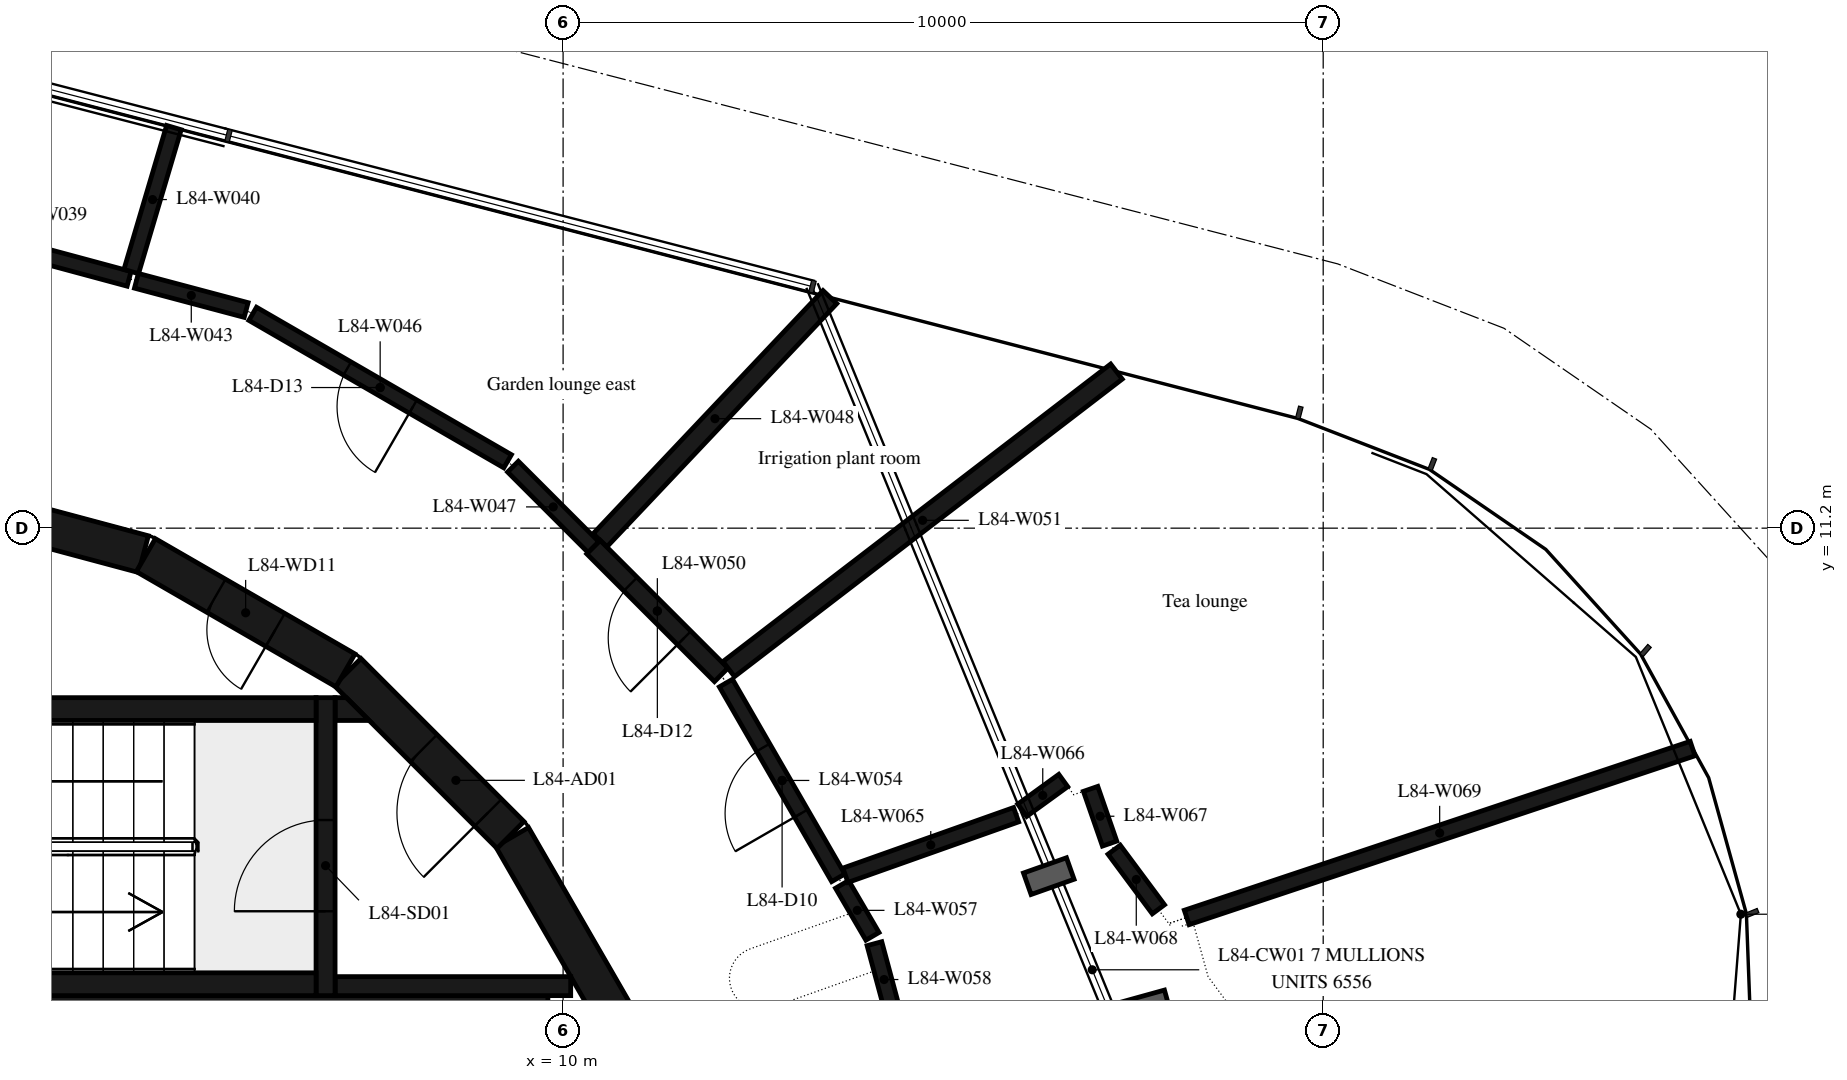
"""IFC4 building model, lengths in metres.
Left out: names, types, materials, properties, quantities, classifications, styles, units other than length and angle.
Written with IfcOpenShell. Run it as: python <this file> out.ifc"""

import sys

from ifc_helpers import new_model, si_unit, direction, frame, frame_2d, origin, place, context, subcontext, project, spatial, polyline, rectangle, outline, extrude, element, fill, save


model = new_model("IFC4")
c1 = context("Model", 3, precision=1e-05, world=origin(), true_north=direction((0.0, 1.0)))
c2 = subcontext(c1, "Body", "Model", "MODEL_VIEW")
j1 = project(units=[si_unit("LENGTHUNIT", "METRE"), si_unit("PLANEANGLEUNIT", "RADIAN")], contexts=[c1])
p1 = place(None, origin())
s1 = spatial("IfcSite", under=j1, at=p1, CompositionType="ELEMENT")
p2 = place(p1, origin())
s2 = spatial("IfcBuilding", under=s1, at=p2, CompositionType="ELEMENT")
p3 = place(p2, frame((0.0, 0.0, 326.2)))
s3 = spatial("IfcBuildingStorey", under=s2, at=p3, CompositionType="ELEMENT", Elevation=326.2)
p4 = place(p3, frame((10.845, 4.51, 0.0), z_axis=(0.0, 0.0, 1.0), x_axis=(-0.500087131594, 0.865975092491, 0.0)))
e1 = element("IfcWall", 1, at=p4, inside=s3, PredefinedType="SHEAR", context=c2, shape_type="SweptSolid", body=[
    extrude(rectangle(XDim=3.033, YDim=0.5, at=frame_2d((1.516, 0.0))), origin(), (0.0, 0.0, 1.0), 6.35),
])
p5 = place(p3, frame((9.308, 7.164, 0.0), z_axis=(0.0, 0.0, 1.0), x_axis=(-0.707106781187, 0.707106781187, 0.0)))
e2 = element("IfcWall", 2, at=p5, inside=s3, PredefinedType="SHEAR", context=c2, shape_type="SweptSolid", body=[
    extrude(rectangle(XDim=3.032, YDim=0.5, at=frame_2d((1.516, 0.0))), origin(), (0.0, 0.0, 1.0), 6.35),
])
p6 = place(p5, frame((0.416, 0.0, 0.0)))
e3 = element("IfcOpeningElement", 3, at=p6, cuts=e2, PredefinedType="OPENING", context=c2, shape_type="SweptSolid", body=[
    extrude(rectangle(XDim=1.2, YDim=2.1, at=frame_2d((0.6, 1.05))), frame((0.0, 0.26, 0.0), z_axis=(0.0, -1.0, 0.0), x_axis=(1.0, 0.0, 0.0)), (0.0, 0.0, 1.0), 0.52),
])
p7 = place(p3, frame((7.137, 9.329, 0.0), z_axis=(0.0, 0.0, 1.0), x_axis=(-0.865975092491, 0.500087131594, 0.0)))
e4 = element("IfcWall", 4, at=p7, inside=s3, PredefinedType="SHEAR", context=c2, shape_type="SweptSolid", body=[
    extrude(rectangle(XDim=3.033, YDim=0.5, at=frame_2d((1.516, 0.0))), origin(), (0.0, 0.0, 1.0), 6.35),
])
p8 = place(p7, frame((1.066, 0.0, 0.0)))
e5 = element("IfcOpeningElement", 5, at=p8, cuts=e4, PredefinedType="OPENING", context=c2, shape_type="SweptSolid", body=[
    extrude(rectangle(XDim=0.9, YDim=2.1, at=frame_2d((0.45, 1.05))), frame((0.0, 0.26, 0.0), z_axis=(0.0, -1.0, 0.0), x_axis=(1.0, 0.0, 0.0)), (0.0, 0.0, 1.0), 0.52),
])
p9 = place(p3, frame((4.479, 10.858, 0.0), z_axis=(0.0, 0.0, 1.0), x_axis=(-0.965948410781, 0.258734743916, 0.0)))
e6 = element("IfcWall", 6, at=p9, inside=s3, PredefinedType="SHEAR", context=c2, shape_type="SweptSolid", body=[
    extrude(rectangle(XDim=3.033, YDim=0.5, at=frame_2d((1.516, 0.0))), origin(), (0.0, 0.0, 1.0), 6.35),
])
for number, where, z_axis, x_axis in (
    (7, (0.0, 5.2, 0.0), (0.0, 0.0, 1.0), (1.0, 0.0, 0.0)),
    (8, (0.0, 8.82, 0.0), (0.0, 0.0, 1.0), (1.0, 0.0, 0.0)),
):
    element("IfcWall", number, at=place(p3, frame(where, z_axis=z_axis, x_axis=x_axis)), inside=s3, PredefinedType="SHEAR", context=c2, shape_type="SweptSolid", body=[
        extrude(rectangle(XDim=6.75, YDim=0.3, at=frame_2d((3.375, 0.0))), origin(), (0.0, 0.0, 1.0), 6.35),
    ])
p10 = place(p3, frame((6.875, 5.05, 0.0), z_axis=(0.0, 0.0, 1.0), x_axis=(0.0, 1.0, 0.0)))
e9 = element("IfcWall", 9, at=p10, inside=s3, PredefinedType="SHEAR", context=c2, shape_type="SweptSolid", body=[
    extrude(rectangle(XDim=3.92, YDim=0.25, at=frame_2d((1.96, 0.0))), origin(), (0.0, 0.0, 1.0), 6.35),
])
p11 = place(p10, frame((1.11, 0.0, 0.0)))
e10 = element("IfcOpeningElement", 10, at=p11, cuts=e9, PredefinedType="OPENING", context=c2, shape_type="SweptSolid", body=[
    extrude(rectangle(XDim=1.2, YDim=2.1, at=frame_2d((0.6, 1.05))), frame((0.0, 0.135, 0.0), z_axis=(0.0, -1.0, 0.0), x_axis=(1.0, 0.0, 0.0)), (0.0, 0.0, 1.0), 0.27),
])
p12 = place(p3, frame((7.0, 5.175, 0.0), z_axis=(0.0, 0.0, 1.0), x_axis=(1.0, 0.0, 0.0)))
e11 = element("IfcWall", 11, at=p12, inside=s3, PredefinedType="SHEAR", context=c2, shape_type="SweptSolid", body=[
    extrude(rectangle(XDim=3.1, YDim=0.25, at=frame_2d((1.55, 0.0))), origin(), (0.0, 0.0, 1.0), 6.35),
])
p13 = place(p3, origin())
e12 = element("IfcWall", 12, at=p13, inside=s3, PredefinedType="SHEAR", context=c2, shape_type="SweptSolid", body=[
    extrude(outline(polyline([(7.448, 8.67), (7.0, 8.67), (7.0, 8.97), (7.148, 8.97), (7.448, 8.67)])), origin(), (0.0, 0.0, 1.0), 6.35),
])
p14 = place(p3, origin())
e13 = element("IfcWall", 13, at=p14, inside=s3, PredefinedType="SHEAR", context=c2, shape_type="SweptSolid", body=[
    extrude(outline(polyline([(-9.8, 1.9), (-9.55, 1.9), (-9.55, 4.8), (-5.5, 4.8), (-5.5, 1.9), (-5.25, 1.9), (-5.25, 4.8), (3.1, 4.8), (3.1, 1.9), (3.35, 1.9), (3.35, 4.8), (5.25, 4.8), (5.25, 1.9), (5.5, 1.9), (5.5, 4.8), (7.4, 4.8), (7.4, 1.9), (7.65, 1.9), (7.65, 4.8), (9.55, 4.8), (9.55, 1.9), (9.8, 1.9), (9.8, 4.8), (9.8, 5.05), (-9.8, 5.05), (-9.8, 4.8), (-9.8, 1.9)])), origin(), (0.0, 0.0, 1.0), 6.35),
])
p15 = place(p3, frame((4.29, 14.48, 0.0), z_axis=(0.0, 0.0, 1.0), x_axis=(-0.965529971304, 0.260291902513, 0.0)))
e14 = element("IfcWall", 14, at=p15, inside=s3, PredefinedType="PARTITIONING", context=c2, shape_type="SweptSolid", body=[
    extrude(rectangle(XDim=2.282, YDim=0.2, at=frame_2d((1.141, 0.0))), origin(), (0.0, 0.0, 1.0), 6.35),
])
p16 = place(p3, frame((4.318, 14.576, 0.0), z_axis=(0.0, 0.0, 1.0), x_axis=(0.284239804346, 0.958753218313, 0.0)))
e15 = element("IfcWall", 15, at=p16, inside=s3, PredefinedType="PARTITIONING", context=c2, shape_type="SweptSolid", body=[
    extrude(rectangle(XDim=1.976, YDim=0.2, at=frame_2d((0.988, 0.0))), origin(), (0.0, 0.0, 1.0), 6.35),
])
p17 = place(p3, frame((5.83, 14.07, 0.0), z_axis=(0.0, 0.0, 1.0), x_axis=(-0.966337953359, 0.257276038327, 0.0)))
e16 = element("IfcWall", 16, at=p17, inside=s3, PredefinedType="PARTITIONING", context=c2, shape_type="SweptSolid", body=[
    extrude(rectangle(XDim=1.494, YDim=0.2, at=frame_2d((0.747, 0.0))), origin(), (0.0, 0.0, 1.0), 6.35),
])
p18 = place(p3, frame((9.27, 12.08, 0.0), z_axis=(0.0, 0.0, 1.0), x_axis=(-0.865601686425, 0.500733182901, 0.0)))
e17 = element("IfcWall", 17, at=p18, inside=s3, PredefinedType="PARTITIONING", context=c2, shape_type="SweptSolid", body=[
    extrude(rectangle(XDim=3.874, YDim=0.2, at=frame_2d((1.937, 0.0))), origin(), (0.0, 0.0, 1.0), 6.35),
])
p19 = place(p18, frame((1.437, 0.0, 0.0)))
e18 = element("IfcOpeningElement", 18, at=p19, cuts=e17, PredefinedType="OPENING", context=c2, shape_type="SweptSolid", body=[
    extrude(rectangle(XDim=1.0, YDim=2.1, at=frame_2d((0.5, 1.05))), frame((0.0, 0.11, 0.0), z_axis=(0.0, -1.0, 0.0), x_axis=(1.0, 0.0, 0.0)), (0.0, 0.0, 1.0), 0.22),
])
p20 = place(p3, frame((10.4, 10.95, 0.0), z_axis=(0.0, 0.0, 1.0), x_axis=(-0.707025284411, 0.70718826857, 0.0)))
e19 = element("IfcWall", 19, at=p20, inside=s3, PredefinedType="PARTITIONING", context=c2, shape_type="SweptSolid", body=[
    extrude(rectangle(XDim=1.498, YDim=0.2, at=frame_2d((0.749, 0.0))), origin(), (0.0, 0.0, 1.0), 6.35),
])
p21 = place(p3, frame((10.486, 11.041, 0.0), z_axis=(0.0, 0.0, 1.0), x_axis=(0.686945894081, 0.726708565111, 0.0)))
e20 = element("IfcWall", 20, at=p21, inside=s3, PredefinedType="PARTITIONING", context=c2, shape_type="SweptSolid", body=[
    extrude(rectangle(XDim=4.402, YDim=0.25, at=frame_2d((2.201, 0.0))), origin(), (0.0, 0.0, 1.0), 6.35),
])
p22 = place(p3, frame((12.08, 9.27, 0.0), z_axis=(0.0, 0.0, 1.0), x_axis=(-0.707158156693, 0.707055401947, 0.0)))
e21 = element("IfcWall", 21, at=p22, inside=s3, PredefinedType="PARTITIONING", context=c2, shape_type="SweptSolid", body=[
    extrude(rectangle(XDim=2.376, YDim=0.25, at=frame_2d((1.188, 0.0))), origin(), (0.0, 0.0, 1.0), 6.35),
])
p23 = place(p22, frame((0.688, 0.0, 0.0)))
e22 = element("IfcOpeningElement", 22, at=p23, cuts=e21, PredefinedType="OPENING", context=c2, shape_type="SweptSolid", body=[
    extrude(rectangle(XDim=1.0, YDim=2.1, at=frame_2d((0.5, 1.05))), frame((0.0, 0.135, 0.0), z_axis=(0.0, -1.0, 0.0), x_axis=(1.0, 0.0, 0.0)), (0.0, 0.0, 1.0), 0.27),
])
p24 = place(p3, frame((12.179, 9.346, 0.0), z_axis=(0.0, 0.0, 1.0), x_axis=(0.793367328709, 0.608743198513, 0.0)))
e23 = element("IfcWall", 23, at=p24, inside=s3, PredefinedType="PARTITIONING", context=c2, shape_type="SweptSolid", body=[
    extrude(rectangle(XDim=6.429, YDim=0.25, at=frame_2d((3.215, 0.0))), origin(), (0.0, 0.0, 1.0), 6.35),
])
p25 = place(p3, frame((13.62, 6.6, 0.0), z_axis=(0.0, 0.0, 1.0), x_axis=(-0.499717688814, 0.866188334882, 0.0)))
e24 = element("IfcWall", 24, at=p25, inside=s3, PredefinedType="PARTITIONING", context=c2, shape_type="SweptSolid", body=[
    extrude(rectangle(XDim=2.957, YDim=0.2, at=frame_2d((1.479, 0.0))), origin(), (0.0, 0.0, 1.0), 6.35),
])
p26 = place(p25, frame((0.979, 0.0, 0.0)))
e25 = element("IfcOpeningElement", 25, at=p26, cuts=e24, PredefinedType="OPENING", context=c2, shape_type="SweptSolid", body=[
    extrude(rectangle(XDim=1.0, YDim=2.1, at=frame_2d((0.5, 1.05))), frame((0.0, 0.11, 0.0), z_axis=(0.0, -1.0, 0.0), x_axis=(1.0, 0.0, 0.0)), (0.0, 0.0, 1.0), 0.22),
])
p27 = place(p3, frame((14.07, 5.83, 0.0), z_axis=(0.0, 0.0, 1.0), x_axis=(-0.504714262811, 0.863286460519, 0.0)))
e26 = element("IfcWall", 26, at=p27, inside=s3, PredefinedType="PARTITIONING", context=c2, shape_type="SweptSolid", body=[
    extrude(rectangle(XDim=0.792, YDim=0.2, at=frame_2d((0.396, 0.0))), origin(), (0.0, 0.0, 1.0), 6.35),
])
p28 = place(p3, frame((14.35, 4.79, 0.0), z_axis=(0.0, 0.0, 1.0), x_axis=(-0.260134777682, 0.965572316008, 0.0)))
e27 = element("IfcWall", 27, at=p28, inside=s3, PredefinedType="PARTITIONING", context=c2, shape_type="SweptSolid", body=[
    extrude(rectangle(XDim=0.977, YDim=0.2, at=frame_2d((0.489, 0.0))), origin(), (0.0, 0.0, 1.0), 6.35),
])
p29 = place(p3, frame((15.96, 7.43, 0.0), z_axis=(0.0, 0.0, 1.0), x_axis=(-0.942486066919, -0.334245439257, 0.0)))
e28 = element("IfcWall", 28, at=p29, inside=s3, PredefinedType="PARTITIONING", context=c2, shape_type="SweptSolid", body=[
    extrude(rectangle(XDim=2.383, YDim=0.2, at=frame_2d((1.191, 0.0))), origin(), (0.0, 0.0, 1.0), 6.35),
])
p30 = place(p3, frame((16.58, 7.88, 0.0), z_axis=(0.0, 0.0, 1.0), x_axis=(-0.809401348722, -0.587255869861, 0.0)))
e29 = element("IfcWall", 29, at=p30, inside=s3, PredefinedType="PARTITIONING", context=c2, shape_type="SweptSolid", body=[
    extrude(rectangle(XDim=0.666, YDim=0.2, at=frame_2d((0.333, 0.0))), origin(), (0.0, 0.0, 1.0), 6.35),
])
p31 = place(p3, frame((17.19, 7.05, 0.0), z_axis=(0.0, 0.0, 1.0), x_axis=(-0.328023600199, 0.944669528307, 0.0)))
e30 = element("IfcWall", 30, at=p31, inside=s3, PredefinedType="PARTITIONING", context=c2, shape_type="SweptSolid", body=[
    extrude(rectangle(XDim=0.762, YDim=0.2, at=frame_2d((0.381, 0.0))), origin(), (0.0, 0.0, 1.0), 6.35),
])
p32 = place(p3, frame((17.832, 6.186, 0.0), z_axis=(0.0, 0.0, 1.0), x_axis=(-0.596434451728, 0.8026617873, 0.0)))
e31 = element("IfcWall", 31, at=p32, inside=s3, PredefinedType="PARTITIONING", context=c2, shape_type="SweptSolid", body=[
    extrude(rectangle(XDim=0.977, YDim=0.2, at=frame_2d((0.488, 0.0))), origin(), (0.0, 0.0, 1.0), 6.35),
])
p33 = place(p3, frame((18.205, 6.078, 0.0), z_axis=(0.0, 0.0, 1.0), x_axis=(0.948547510057, 0.316634838836, 0.0)))
e32 = element("IfcWall", 32, at=p33, inside=s3, PredefinedType="PARTITIONING", context=c2, shape_type="SweptSolid", body=[
    extrude(rectangle(XDim=7.017, YDim=0.2, at=frame_2d((3.508, 0.0))), origin(), (0.0, 0.0, 1.0), 6.35),
])
p34 = place(p11, origin())
e33 = element("IfcDoor", 33, at=p34, inside=s3, OperationType="SINGLE_SWING_LEFT", PredefinedType="DOOR", context=c2, shape_type="SweptSolid", body=[
    extrude(rectangle(XDim=1.2, YDim=2.1, at=frame_2d((0.6, 1.05))), frame((0.0, 0.025, 0.0), z_axis=(0.0, -1.0, 0.0), x_axis=(1.0, 0.0, 0.0)), (0.0, 0.0, 1.0), 0.05),
])
fill(e10, e33)
p35 = place(p6, origin())
e34 = element("IfcDoor", 34, at=p35, inside=s3, OperationType="SINGLE_SWING_RIGHT", PredefinedType="DOOR", context=c2, shape_type="SweptSolid", body=[
    extrude(rectangle(XDim=1.2, YDim=2.1, at=frame_2d((0.6, 1.05))), frame((0.0, 0.025, 0.0), z_axis=(0.0, -1.0, 0.0), x_axis=(1.0, 0.0, 0.0)), (0.0, 0.0, 1.0), 0.05),
])
fill(e3, e34)
p36 = place(p8, origin())
e35 = element("IfcDoor", 35, at=p36, inside=s3, OperationType="SINGLE_SWING_LEFT", PredefinedType="DOOR", context=c2, shape_type="SweptSolid", body=[
    extrude(rectangle(XDim=0.9, YDim=2.1, at=frame_2d((0.45, 1.05))), frame((0.0, 0.025, 0.0), z_axis=(0.0, -1.0, 0.0), x_axis=(1.0, 0.0, 0.0)), (0.0, 0.0, 1.0), 0.05),
])
fill(e5, e35)
p37 = place(p26, origin())
e36 = element("IfcDoor", 36, at=p37, inside=s3, OperationType="SINGLE_SWING_LEFT", PredefinedType="DOOR", context=c2, shape_type="SweptSolid", body=[
    extrude(rectangle(XDim=1.0, YDim=2.1, at=frame_2d((0.5, 1.05))), frame((0.0, 0.025, 0.0), z_axis=(0.0, -1.0, 0.0), x_axis=(1.0, 0.0, 0.0)), (0.0, 0.0, 1.0), 0.05),
])
fill(e25, e36)
p38 = place(p23, origin())
e37 = element("IfcDoor", 37, at=p38, inside=s3, OperationType="SINGLE_SWING_LEFT", PredefinedType="DOOR", context=c2, shape_type="SweptSolid", body=[
    extrude(rectangle(XDim=1.0, YDim=2.1, at=frame_2d((0.5, 1.05))), frame((0.0, 0.025, 0.0), z_axis=(0.0, -1.0, 0.0), x_axis=(1.0, 0.0, 0.0)), (0.0, 0.0, 1.0), 0.05),
])
fill(e22, e37)
p39 = place(p19, origin())
e38 = element("IfcDoor", 38, at=p39, inside=s3, OperationType="SINGLE_SWING_LEFT", PredefinedType="DOOR", context=c2, shape_type="SweptSolid", body=[
    extrude(rectangle(XDim=1.0, YDim=2.1, at=frame_2d((0.5, 1.05))), frame((0.0, 0.025, 0.0), z_axis=(0.0, -1.0, 0.0), x_axis=(1.0, 0.0, 0.0)), (0.0, 0.0, 1.0), 0.05),
])
fill(e18, e38)
save(model, sys.argv[1])
